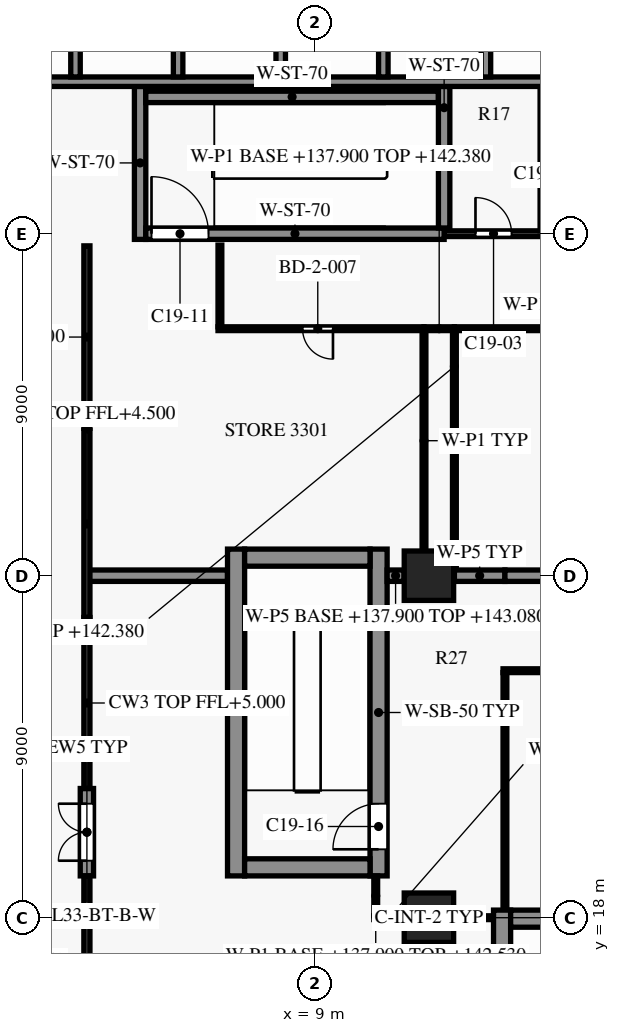
"""IFC4 building model, lengths in metres.
Left out: names, types, materials, properties, quantities, classifications, styles, units other than length and angle.
Written with IfcOpenShell. Run it as: python <this file> out.ifc"""

import sys

from ifc_helpers import new_model, si_unit, direction, frame, frame_2d, origin, origin_2d, place, context, subcontext, project, spatial, rectangle, extrude, element, fill, save


model = new_model("IFC4")
c1 = context("Model", 3, precision=1e-05, world=origin(), true_north=direction((0.0, 1.0)))
c2 = subcontext(c1, "Body", "Model", "MODEL_VIEW")
j1 = project(units=[si_unit("LENGTHUNIT", "METRE"), si_unit("PLANEANGLEUNIT", "RADIAN")], contexts=[c1])
p1 = place(None, origin())
s1 = spatial("IfcSite", under=j1, at=p1, CompositionType="ELEMENT")
p2 = place(p1, origin())
s2 = spatial("IfcBuilding", under=s1, at=p2, CompositionType="ELEMENT")
p3 = place(p2, frame((0.0, 0.0, 137.9)))
s3 = spatial("IfcBuildingStorey", under=s2, at=p3, CompositionType="ELEMENT", Elevation=137.9)
for number, where, z_axis, x_axis in (
    (1, (12.0, 18.0, 0.0), (0.0, 0.0, 1.0), (1.0, 0.0, 0.0)),
    (2, (12.0, 27.0, 0.0), (0.0, 0.0, 1.0), (1.0, 0.0, 0.0)),
):
    element("IfcColumn", number, at=place(p3, frame(where, z_axis=z_axis, x_axis=x_axis)), inside=s3, PredefinedType="COLUMN", context=c2, shape_type="SweptSolid", body=[
        extrude(rectangle(XDim=1.3, YDim=1.3, at=origin_2d()), origin(), (0.0, 0.0, 1.0), 5.5),
    ])
p4 = place(p3, frame((3.0, 19.1, 0.0), z_axis=(0.0, 0.0, 1.0), x_axis=(0.0, 1.0, 0.0)))
e3 = element("IfcWall", 3, at=p4, inside=s3, PredefinedType="SOLIDWALL", context=c2, shape_type="SweptSolid", body=[
    extrude(rectangle(XDim=2.3, YDim=0.35, at=frame_2d((1.15, 0.0))), origin(), (0.0, 0.0, 1.0), 5.0),
])
p5 = place(p4, frame((0.4, 0.0, 0.0)))
e4 = element("IfcOpeningElement", 4, at=p5, cuts=e3, PredefinedType="OPENING", context=c2, shape_type="SweptSolid", body=[
    extrude(rectangle(XDim=1.5, YDim=2.4, at=frame_2d((0.75, 1.2))), frame((0.0, 0.185, 0.0), z_axis=(0.0, -1.0, 0.0), x_axis=(1.0, 0.0, 0.0)), (0.0, 0.0, 1.0), 0.37),
])
for number, where, z_axis, x_axis in (
    (5, (14.15, 17.975, 0.0), (0.0, 0.0, 1.0), (1.0, 0.0, 0.0)),
    (6, (7.15, 19.325, 0.0), (0.0, 0.0, 1.0), (1.0, 0.0, 0.0)),
    (7, (7.15, 27.475, 0.0), (0.0, 0.0, 1.0), (1.0, 0.0, 0.0)),
):
    element("IfcWall", number, at=place(p3, frame(where, z_axis=z_axis, x_axis=x_axis)), inside=s3, PredefinedType="SHEAR", context=c2, shape_type="SweptSolid", body=[
        extrude(rectangle(XDim=3.3, YDim=0.45, at=frame_2d((1.65, 0.0))), origin(), (0.0, 0.0, 1.0), 5.2),
    ])
p6 = place(p3, frame((12.4, 36.0, 0.0), z_axis=(0.0, 0.0, 1.0), x_axis=(1.0, 0.0, 0.0)))
e8 = element("IfcWall", 8, at=p6, inside=s3, PredefinedType="SHEAR", context=c2, shape_type="SweptSolid", body=[
    extrude(rectangle(XDim=11.825, YDim=0.15, at=frame_2d((5.913, 0.0))), origin(), (0.0, 0.0, 1.0), 5.2),
])
p7 = place(p6, frame((0.825, 0.0, 0.0)))
e9 = element("IfcOpeningElement", 9, at=p7, cuts=e8, PredefinedType="OPENING", context=c2, shape_type="SweptSolid", body=[
    extrude(rectangle(XDim=0.95, YDim=2.1, at=frame_2d((0.475, 1.05))), frame((0.0, 0.085, 0.0), z_axis=(0.0, -1.0, 0.0), x_axis=(1.0, 0.0, 0.0)), (0.0, 0.0, 1.0), 0.17),
])
p8 = place(p6, frame((3.65, 0.0, 0.0)))
e10 = element("IfcOpeningElement", 10, at=p8, cuts=e8, PredefinedType="OPENING", context=c2, shape_type="SweptSolid", body=[
    extrude(rectangle(XDim=1.0, YDim=2.1, at=frame_2d((0.5, 1.05))), frame((0.0, 0.085, 0.0), z_axis=(0.0, -1.0, 0.0), x_axis=(1.0, 0.0, 0.0)), (0.0, 0.0, 1.0), 0.17),
])
p9 = place(p6, frame((6.8, 0.0, 0.0)))
e11 = element("IfcOpeningElement", 11, at=p9, cuts=e8, PredefinedType="OPENING", context=c2, shape_type="SweptSolid", body=[
    extrude(rectangle(XDim=0.9, YDim=2.1, at=frame_2d((0.45, 1.05))), frame((0.0, 0.085, 0.0), z_axis=(0.0, -1.0, 0.0), x_axis=(1.0, 0.0, 0.0)), (0.0, 0.0, 1.0), 0.17),
])
p10 = place(p6, frame((9.9, 0.0, 0.0)))
e12 = element("IfcOpeningElement", 12, at=p10, cuts=e8, PredefinedType="OPENING", context=c2, shape_type="SweptSolid", body=[
    extrude(rectangle(XDim=0.9, YDim=2.1, at=frame_2d((0.45, 1.05))), frame((0.0, 0.085, 0.0), z_axis=(0.0, -1.0, 0.0), x_axis=(1.0, 0.0, 0.0)), (0.0, 0.0, 1.0), 0.17),
])
p11 = place(p3, frame((4.55, 36.0, 0.0), z_axis=(0.0, 0.0, 1.0), x_axis=(1.0, 0.0, 0.0)))
e13 = element("IfcWall", 13, at=p11, inside=s3, PredefinedType="SHEAR", context=c2, shape_type="SweptSolid", body=[
    extrude(rectangle(XDim=7.85, YDim=0.3, at=frame_2d((3.925, 0.0))), origin(), (0.0, 0.0, 1.0), 5.2),
])
p12 = place(p11, frame((0.15, 0.0, 0.0)))
e14 = element("IfcOpeningElement", 14, at=p12, cuts=e13, PredefinedType="OPENING", context=c2, shape_type="SweptSolid", body=[
    extrude(rectangle(XDim=1.5, YDim=2.2, at=frame_2d((0.75, 1.1))), frame((0.0, 0.16, 0.0), z_axis=(0.0, -1.0, 0.0), x_axis=(1.0, 0.0, 0.0)), (0.0, 0.0, 1.0), 0.32),
])
p13 = place(p3, frame((4.55, 39.6, 0.0), z_axis=(0.0, 0.0, 1.0), x_axis=(1.0, 0.0, 0.0)))
e15 = element("IfcWall", 15, at=p13, inside=s3, PredefinedType="SHEAR", context=c2, shape_type="SweptSolid", body=[
    extrude(rectangle(XDim=7.7, YDim=0.3, at=frame_2d((3.85, 0.0))), origin(), (0.0, 0.0, 1.0), 5.2),
])
p14 = place(p3, frame((0.125, 40.0, 0.0), z_axis=(0.0, 0.0, 1.0), x_axis=(1.0, 0.0, 0.0)))
e16 = element("IfcWall", 16, at=p14, inside=s3, PredefinedType="SHEAR", context=c2, shape_type="SweptSolid", body=[
    extrude(rectangle(XDim=21.475, YDim=0.25, at=frame_2d((10.738, 0.0))), origin(), (0.0, 0.0, 1.0), 5.2),
])
p15 = place(p3, frame((2.7, 40.125, 0.0), z_axis=(0.0, 0.0, 1.0), x_axis=(0.0, 1.0, 0.0)))
e17 = element("IfcWall", 17, at=p15, inside=s3, PredefinedType="SHEAR", context=c2, shape_type="SweptSolid", body=[
    extrude(rectangle(XDim=2.95, YDim=0.25, at=frame_2d((1.475, 0.0))), origin(), (0.0, 0.0, 1.0), 5.2),
])
p16 = place(p3, frame((4.4, 35.85, 0.0), z_axis=(0.0, 0.0, 1.0), x_axis=(0.0, 1.0, 0.0)))
e18 = element("IfcWall", 18, at=p16, inside=s3, PredefinedType="SHEAR", context=c2, shape_type="SweptSolid", body=[
    extrude(rectangle(XDim=4.025, YDim=0.3, at=frame_2d((2.012, 0.0))), origin(), (0.0, 0.0, 1.0), 5.2),
])
p17 = place(p3, frame((5.4, 40.125, 0.0), z_axis=(0.0, 0.0, 1.0), x_axis=(0.0, 1.0, 0.0)))
e19 = element("IfcWall", 19, at=p17, inside=s3, PredefinedType="SHEAR", context=c2, shape_type="SweptSolid", body=[
    extrude(rectangle(XDim=2.95, YDim=0.25, at=frame_2d((1.475, 0.0))), origin(), (0.0, 0.0, 1.0), 5.2),
])
p18 = place(p3, frame((6.925, 19.1, 0.0), z_axis=(0.0, 0.0, 1.0), x_axis=(0.0, 1.0, 0.0)))
e20 = element("IfcWall", 20, at=p18, inside=s3, PredefinedType="SHEAR", context=c2, shape_type="SweptSolid", body=[
    extrude(rectangle(XDim=8.6, YDim=0.45, at=frame_2d((4.3, 0.0))), origin(), (0.0, 0.0, 1.0), 5.2),
])
p19 = place(p3, frame((8.1, 40.125, 0.0), z_axis=(0.0, 0.0, 1.0), x_axis=(0.0, 1.0, 0.0)))
e21 = element("IfcWall", 21, at=p19, inside=s3, PredefinedType="SHEAR", context=c2, shape_type="SweptSolid", body=[
    extrude(rectangle(XDim=2.95, YDim=0.25, at=frame_2d((1.475, 0.0))), origin(), (0.0, 0.0, 1.0), 5.2),
])
p20 = place(p3, frame((10.675, 19.1, 0.0), z_axis=(0.0, 0.0, 1.0), x_axis=(0.0, 1.0, 0.0)))
e22 = element("IfcWall", 22, at=p20, inside=s3, PredefinedType="SHEAR", context=c2, shape_type="SweptSolid", body=[
    extrude(rectangle(XDim=8.6, YDim=0.45, at=frame_2d((4.3, 0.0))), origin(), (0.0, 0.0, 1.0), 5.2),
])
p21 = place(p20, frame((0.7, 0.0, 0.0)))
e23 = element("IfcOpeningElement", 23, at=p21, cuts=e22, PredefinedType="OPENING", context=c2, shape_type="SweptSolid", body=[
    extrude(rectangle(XDim=1.2, YDim=2.2, at=frame_2d((0.6, 1.1))), frame((0.0, 0.235, 0.0), z_axis=(0.0, -1.0, 0.0), x_axis=(1.0, 0.0, 0.0)), (0.0, 0.0, 1.0), 0.47),
])
p22 = place(p3, frame((10.8, 40.125, 0.0), z_axis=(0.0, 0.0, 1.0), x_axis=(0.0, 1.0, 0.0)))
e24 = element("IfcWall", 24, at=p22, inside=s3, PredefinedType="SHEAR", context=c2, shape_type="SweptSolid", body=[
    extrude(rectangle(XDim=2.95, YDim=0.25, at=frame_2d((1.475, 0.0))), origin(), (0.0, 0.0, 1.0), 5.2),
])
p23 = place(p3, frame((12.4, 36.15, 0.0), z_axis=(0.0, 0.0, 1.0), x_axis=(0.0, 1.0, 0.0)))
e25 = element("IfcWall", 25, at=p23, inside=s3, PredefinedType="SHEAR", context=c2, shape_type="SweptSolid", body=[
    extrude(rectangle(XDim=3.725, YDim=0.3, at=frame_2d((1.863, 0.0))), origin(), (0.0, 0.0, 1.0), 5.2),
])
p24 = place(p3, frame((13.5, 40.125, 0.0), z_axis=(0.0, 0.0, 1.0), x_axis=(0.0, 1.0, 0.0)))
e26 = element("IfcWall", 26, at=p24, inside=s3, PredefinedType="SHEAR", context=c2, shape_type="SweptSolid", body=[
    extrude(rectangle(XDim=2.95, YDim=0.25, at=frame_2d((1.475, 0.0))), origin(), (0.0, 0.0, 1.0), 5.2),
])
p25 = place(p3, frame((13.925, 9.55, 0.0), z_axis=(0.0, 0.0, 1.0), x_axis=(0.0, 1.0, 0.0)))
e27 = element("IfcWall", 27, at=p25, inside=s3, PredefinedType="SHEAR", context=c2, shape_type="SweptSolid", body=[
    extrude(rectangle(XDim=8.65, YDim=0.45, at=frame_2d((4.325, 0.0))), origin(), (0.0, 0.0, 1.0), 5.2),
])
p26 = place(p3, frame((11.345, 18.0, 0.0), z_axis=(0.0, 0.0, 1.0), x_axis=(-1.0, 0.0, 0.0)))
e28 = element("IfcWall", 28, at=p26, inside=s3, PredefinedType="PARTITIONING", context=c2, shape_type="SweptSolid", body=[
    extrude(rectangle(XDim=0.795, YDim=0.1, at=frame_2d((0.397, 0.0))), origin(), (0.0, 0.0, 1.0), 4.63),
])
p27 = place(p3, frame((13.7, 18.0, 0.0), z_axis=(0.0, 0.0, 1.0), x_axis=(-1.0, 0.0, 0.0)))
e29 = element("IfcWall", 29, at=p27, inside=s3, PredefinedType="PARTITIONING", context=c2, shape_type="SweptSolid", body=[
    extrude(rectangle(XDim=1.045, YDim=0.1, at=frame_2d((0.522, 0.0))), origin(), (0.0, 0.0, 1.0), 4.48),
])
p28 = place(p3, frame((10.6, 18.05, 0.0), z_axis=(0.0, 0.0, 1.0), x_axis=(0.0, 1.0, 0.0)))
e30 = element("IfcWall", 30, at=p28, inside=s3, PredefinedType="PARTITIONING", context=c2, shape_type="SweptSolid", body=[
    extrude(rectangle(XDim=1.05, YDim=0.1, at=frame_2d((0.525, 0.0))), origin(), (0.0, 0.0, 1.0), 4.63),
])
p29 = place(p3, frame((14.0, 24.45, 0.0), z_axis=(0.0, 0.0, 1.0), x_axis=(0.0, -1.0, 0.0)))
e31 = element("IfcWall", 31, at=p29, inside=s3, PredefinedType="PARTITIONING", context=c2, shape_type="SweptSolid", body=[
    extrude(rectangle(XDim=6.25, YDim=0.1, at=frame_2d((3.125, 0.0))), origin(), (0.0, 0.0, 1.0), 5.18),
])
p30 = place(p3, frame((17.95, 24.5, 0.0), z_axis=(0.0, 0.0, 1.0), x_axis=(-1.0, 0.0, 0.0)))
e32 = element("IfcWall", 32, at=p30, inside=s3, PredefinedType="PARTITIONING", context=c2, shape_type="SweptSolid", body=[
    extrude(rectangle(XDim=4.0, YDim=0.1, at=frame_2d((2.0, 0.0))), origin(), (0.0, 0.0, 1.0), 4.48),
])
p31 = place(p3, frame((6.7, 27.0, 0.0), z_axis=(0.0, 0.0, 1.0), x_axis=(-1.0, 0.0, 0.0)))
e33 = element("IfcWall", 33, at=p31, inside=s3, PredefinedType="PARTITIONING", context=c2, shape_type="SweptSolid", body=[
    extrude(rectangle(XDim=3.75, YDim=0.3, at=frame_2d((1.875, 0.0))), origin(), (0.0, 0.0, 1.0), 4.48),
])
p32 = place(p3, frame((10.9, 27.0, 0.0), z_axis=(0.0, 0.0, 1.0), x_axis=(1.0, 0.0, 0.0)))
e34 = element("IfcWall", 34, at=p32, inside=s3, PredefinedType="PARTITIONING", context=c2, shape_type="SweptSolid", body=[
    extrude(rectangle(XDim=0.445, YDim=0.3, at=frame_2d((0.223, 0.0))), origin(), (0.0, 0.0, 1.0), 5.18),
])
p33 = place(p3, frame((12.67, 27.0, 0.0), z_axis=(0.0, 0.0, 1.0), x_axis=(1.0, 0.0, 0.0)))
e35 = element("IfcWall", 35, at=p33, inside=s3, PredefinedType="PARTITIONING", context=c2, shape_type="SweptSolid", body=[
    extrude(rectangle(XDim=1.33, YDim=0.3, at=frame_2d((0.665, 0.0))), origin(), (0.0, 0.0, 1.0), 4.48),
])
p34 = place(p3, frame((14.0, 27.0, 0.0), z_axis=(0.0, 0.0, 1.0), x_axis=(1.0, 0.0, 0.0)))
e36 = element("IfcWall", 36, at=p34, inside=s3, PredefinedType="PARTITIONING", context=c2, shape_type="SweptSolid", body=[
    extrude(rectangle(XDim=3.9, YDim=0.3, at=frame_2d((1.95, 0.0))), origin(), (0.0, 0.0, 1.0), 4.48),
])
p35 = place(p3, frame((12.67, 27.17, 0.0), z_axis=(0.0, 0.0, 1.0), x_axis=(0.0, 1.0, 0.0)))
e37 = element("IfcWall", 37, at=p35, inside=s3, PredefinedType="PARTITIONING", context=c2, shape_type="SweptSolid", body=[
    extrude(rectangle(XDim=6.28, YDim=0.1, at=frame_2d((3.14, 0.0))), origin(), (0.0, 0.0, 1.0), 4.48),
])
p36 = place(p3, frame((11.87, 33.45, 0.0), z_axis=(0.0, 0.0, 1.0), x_axis=(0.0, -1.0, 0.0)))
e38 = element("IfcWall", 38, at=p36, inside=s3, PredefinedType="PARTITIONING", context=c2, shape_type="SweptSolid", body=[
    extrude(rectangle(XDim=5.795, YDim=0.1, at=frame_2d((2.897, 0.0))), origin(), (0.0, 0.0, 1.0), 5.18),
])
p37 = place(p3, frame((11.87, 33.5, 0.0), z_axis=(0.0, 0.0, 1.0), x_axis=(-1.0, 0.0, 0.0)))
e39 = element("IfcWall", 39, at=p37, inside=s3, PredefinedType="PARTITIONING", context=c2, shape_type="SweptSolid", body=[
    extrude(rectangle(XDim=5.42, YDim=0.1, at=frame_2d((2.71, 0.0))), origin(), (0.0, 0.0, 1.0), 5.18),
])
p38 = place(p37, frame((2.395, 0.0, 0.0)))
e40 = element("IfcOpeningElement", 40, at=p38, cuts=e39, PredefinedType="OPENING", context=c2, shape_type="SweptSolid", body=[
    extrude(rectangle(XDim=0.8, YDim=2.1, at=frame_2d((0.4, 1.05))), frame((0.0, 0.06, 0.0), z_axis=(0.0, -1.0, 0.0), x_axis=(1.0, 0.0, 0.0)), (0.0, 0.0, 1.0), 0.12),
])
p39 = place(p3, frame((12.67, 33.5, 0.0), z_axis=(0.0, 0.0, 1.0), x_axis=(-1.0, 0.0, 0.0)))
e41 = element("IfcWall", 41, at=p39, inside=s3, PredefinedType="PARTITIONING", context=c2, shape_type="SweptSolid", body=[
    extrude(rectangle(XDim=0.8, YDim=0.1, at=frame_2d((0.4, 0.0))), origin(), (0.0, 0.0, 1.0), 4.48),
])
p40 = place(p3, frame((17.95, 33.5, 0.0), z_axis=(0.0, 0.0, 1.0), x_axis=(-1.0, 0.0, 0.0)))
e42 = element("IfcWall", 42, at=p40, inside=s3, PredefinedType="PARTITIONING", context=c2, shape_type="SweptSolid", body=[
    extrude(rectangle(XDim=5.28, YDim=0.1, at=frame_2d((2.64, 0.0))), origin(), (0.0, 0.0, 1.0), 5.18),
])
p41 = place(p3, frame((6.5, 33.55, 0.0), z_axis=(0.0, 0.0, 1.0), x_axis=(0.0, 1.0, 0.0)))
e43 = element("IfcWall", 43, at=p41, inside=s3, PredefinedType="PARTITIONING", context=c2, shape_type="SweptSolid", body=[
    extrude(rectangle(XDim=2.15, YDim=0.1, at=frame_2d((1.075, 0.0))), origin(), (0.0, 0.0, 1.0), 5.18),
])
p42 = place(p5, origin())
e44 = element("IfcDoor", 44, at=p42, inside=s3, OperationType="DOUBLE_DOOR_SINGLE_SWING", PredefinedType="DOOR", context=c2, shape_type="SweptSolid", body=[
    extrude(rectangle(XDim=1.5, YDim=2.4, at=frame_2d((0.75, 1.2))), frame((0.0, 0.025, 0.0), z_axis=(0.0, -1.0, 0.0), x_axis=(1.0, 0.0, 0.0)), (0.0, 0.0, 1.0), 0.05),
])
fill(e4, e44)
p43 = place(p7, origin())
e45 = element("IfcDoor", 45, at=p43, inside=s3, OperationType="SINGLE_SWING_RIGHT", PredefinedType="DOOR", context=c2, shape_type="SweptSolid", body=[
    extrude(rectangle(XDim=0.95, YDim=2.1, at=frame_2d((0.475, 1.05))), frame((0.0, 0.025, 0.0), z_axis=(0.0, -1.0, 0.0), x_axis=(1.0, 0.0, 0.0)), (0.0, 0.0, 1.0), 0.05),
])
fill(e9, e45)
p44 = place(p12, origin())
e46 = element("IfcDoor", 46, at=p44, inside=s3, OperationType="SINGLE_SWING_RIGHT", PredefinedType="DOOR", context=c2, shape_type="SweptSolid", body=[
    extrude(rectangle(XDim=1.5, YDim=2.2, at=frame_2d((0.75, 1.1))), frame((0.0, 0.025, 0.0), z_axis=(0.0, -1.0, 0.0), x_axis=(1.0, 0.0, 0.0)), (0.0, 0.0, 1.0), 0.05),
])
fill(e14, e46)
p45 = place(p21, origin())
e47 = element("IfcDoor", 47, at=p45, inside=s3, OperationType="SINGLE_SWING_RIGHT", PredefinedType="DOOR", context=c2, shape_type="SweptSolid", body=[
    extrude(rectangle(XDim=1.2, YDim=2.2, at=frame_2d((0.6, 1.1))), frame((0.0, 0.025, 0.0), z_axis=(0.0, -1.0, 0.0), x_axis=(1.0, 0.0, 0.0)), (0.0, 0.0, 1.0), 0.05),
])
fill(e23, e47)
p46 = place(p38, origin())
e48 = element("IfcDoor", 48, at=p46, inside=s3, OperationType="SINGLE_SWING_LEFT", PredefinedType="DOOR", context=c2, shape_type="SweptSolid", body=[
    extrude(rectangle(XDim=0.8, YDim=2.1, at=frame_2d((0.4, 1.05))), frame((0.0, 0.025, 0.0), z_axis=(0.0, -1.0, 0.0), x_axis=(1.0, 0.0, 0.0)), (0.0, 0.0, 1.0), 0.05),
])
fill(e40, e48)
save(model, sys.argv[1])
